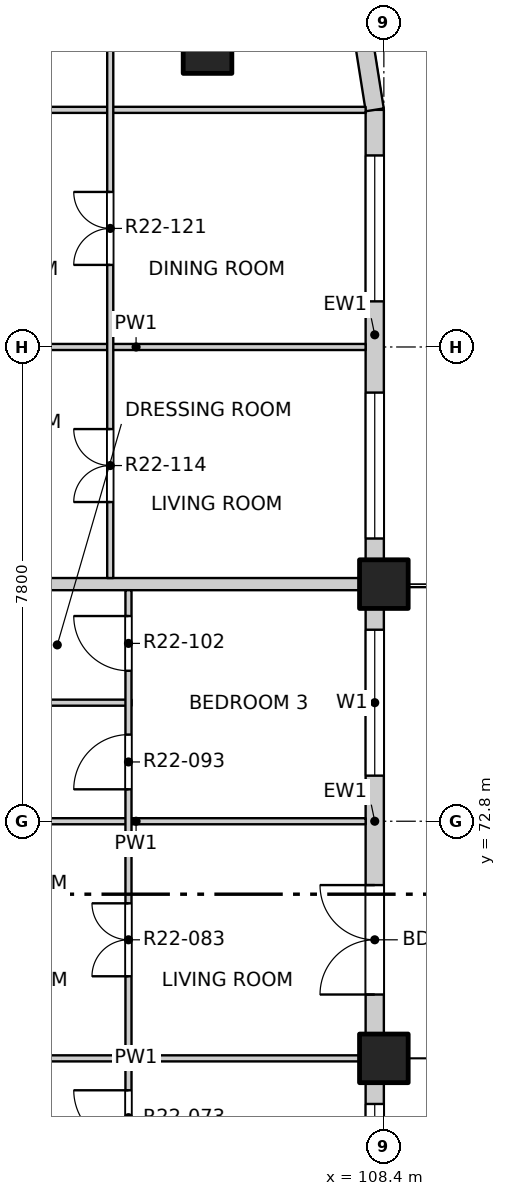
"""IFC4 building model, lengths in metres.
Left out: names, types, materials, properties, quantities, classifications, styles, units other than length and angle.
Written with IfcOpenShell. Run it as: python <this file> out.ifc"""

import sys

from ifc_helpers import new_model, si_unit, direction, frame, frame_2d, origin, origin_2d, place, context, subcontext, project, spatial, rectangle, extrude, element, fill, save


model = new_model("IFC4")
c1 = context("Model", 3, precision=1e-05, world=origin(), true_north=direction((0.0, 1.0)))
c2 = subcontext(c1, "Body", "Model", "MODEL_VIEW")
j1 = project(units=[si_unit("LENGTHUNIT", "METRE"), si_unit("PLANEANGLEUNIT", "RADIAN")], contexts=[c1])
p1 = place(None, origin())
s1 = spatial("IfcSite", under=j1, at=p1, CompositionType="ELEMENT")
p2 = place(p1, origin())
s2 = spatial("IfcBuilding", under=s1, at=p2, CompositionType="ELEMENT")
p3 = place(p2, frame((0.0, 0.0, 224.5)))
s3 = spatial("IfcBuildingStorey", under=s2, at=p3, CompositionType="ELEMENT", Elevation=224.5)
for number, where, z_axis, x_axis in (
    (1, (105.5, 85.5, -0.25), (0.0, 0.0, 1.0), (1.0, 0.0, 0.0)),
    (2, (108.4, 68.9, -0.25), (0.0, 0.0, 1.0), (1.0, 0.0, 0.0)),
    (3, (108.4, 76.7, -0.25), (0.0, 0.0, 1.0), (1.0, 0.0, 0.0)),
):
    element("IfcColumn", number, at=place(p3, frame(where, z_axis=z_axis, x_axis=x_axis)), inside=s3, PredefinedType="COLUMN", context=c2, shape_type="SweptSolid", body=[
        extrude(rectangle(XDim=0.8, YDim=0.8, at=origin_2d()), origin(), (0.0, 0.0, 1.0), 3.4),
    ])
p4 = place(p3, frame((108.25, 61.5, 0.0), z_axis=(0.0, 0.0, 1.0), x_axis=(0.0, 1.0, 0.0)))
e4 = element("IfcWall", 4, at=p4, inside=s3, PredefinedType="SOLIDWALL", context=c2, shape_type="SweptSolid", body=[
    extrude(rectangle(XDim=7.0, YDim=0.3, at=frame_2d((3.5, 0.0))), origin(), (0.0, 0.0, 1.0), 2.7),
])
p5 = place(p4, frame((0.65, 0.0, 0.0)))
e5 = element("IfcOpeningElement", 5, at=p5, cuts=e4, PredefinedType="OPENING", context=c2, shape_type="SweptSolid", body=[
    extrude(rectangle(XDim=1.8, YDim=2.4, at=frame_2d((0.9, 1.2))), frame((0.0, 0.16, 0.0), z_axis=(0.0, -1.0, 0.0), x_axis=(1.0, 0.0, 0.0)), (0.0, 0.0, 1.0), 0.32),
])
p6 = place(p4, frame((4.25, 0.0, 0.9)))
e6 = element("IfcOpeningElement", 6, at=p6, cuts=e4, PredefinedType="OPENING", context=c2, shape_type="SweptSolid", body=[
    extrude(rectangle(XDim=2.4, YDim=1.8, at=frame_2d((1.2, 0.9))), frame((0.0, 0.16, 0.0), z_axis=(0.0, -1.0, 0.0), x_axis=(1.0, 0.0, 0.0)), (0.0, 0.0, 1.0), 0.32),
])
p7 = place(p3, frame((108.25, 69.3, 0.0), z_axis=(0.0, 0.0, 1.0), x_axis=(0.0, 1.0, 0.0)))
e7 = element("IfcWall", 7, at=p7, inside=s3, PredefinedType="SOLIDWALL", context=c2, shape_type="SweptSolid", body=[
    extrude(rectangle(XDim=7.0, YDim=0.3, at=frame_2d((3.5, 0.0))), origin(), (0.0, 0.0, 1.0), 2.7),
])
p8 = place(p7, frame((0.65, 0.0, 0.0)))
e8 = element("IfcOpeningElement", 8, at=p8, cuts=e7, PredefinedType="OPENING", context=c2, shape_type="SweptSolid", body=[
    extrude(rectangle(XDim=1.8, YDim=2.4, at=frame_2d((0.9, 1.2))), frame((0.0, 0.16, 0.0), z_axis=(0.0, -1.0, 0.0), x_axis=(1.0, 0.0, 0.0)), (0.0, 0.0, 1.0), 0.32),
])
p9 = place(p7, frame((4.25, 0.0, 0.9)))
e9 = element("IfcOpeningElement", 9, at=p9, cuts=e7, PredefinedType="OPENING", context=c2, shape_type="SweptSolid", body=[
    extrude(rectangle(XDim=2.4, YDim=1.8, at=frame_2d((1.2, 0.9))), frame((0.0, 0.16, 0.0), z_axis=(0.0, -1.0, 0.0), x_axis=(1.0, 0.0, 0.0)), (0.0, 0.0, 1.0), 0.32),
])
p10 = place(p3, frame((108.25, 77.1, 0.0), z_axis=(0.0, 0.0, 1.0), x_axis=(0.0, 1.0, 0.0)))
e10 = element("IfcWall", 10, at=p10, inside=s3, PredefinedType="SOLIDWALL", context=c2, shape_type="SweptSolid", body=[
    extrude(rectangle(XDim=7.4, YDim=0.3, at=frame_2d((3.7, 0.0))), origin(), (0.0, 0.0, 1.0), 2.7),
])
p11 = place(p10, frame((0.35, 0.0, 0.9)))
e11 = element("IfcOpeningElement", 11, at=p11, cuts=e10, PredefinedType="OPENING", context=c2, shape_type="SweptSolid", body=[
    extrude(rectangle(XDim=2.4, YDim=1.8, at=frame_2d((1.2, 0.9))), frame((0.0, 0.16, 0.0), z_axis=(0.0, -1.0, 0.0), x_axis=(1.0, 0.0, 0.0)), (0.0, 0.0, 1.0), 0.32),
])
p12 = place(p10, frame((4.25, 0.0, 0.9)))
e12 = element("IfcOpeningElement", 12, at=p12, cuts=e10, PredefinedType="OPENING", context=c2, shape_type="SweptSolid", body=[
    extrude(rectangle(XDim=2.4, YDim=1.8, at=frame_2d((1.2, 0.9))), frame((0.0, 0.16, 0.0), z_axis=(0.0, -1.0, 0.0), x_axis=(1.0, 0.0, 0.0)), (0.0, 0.0, 1.0), 0.32),
])
p13 = place(p3, frame((108.25, 84.5, 0.0), z_axis=(0.0, 0.0, 1.0), x_axis=(-0.156496880861, 0.987678452879, 0.0)))
e13 = element("IfcWall", 13, at=p13, inside=s3, PredefinedType="SOLIDWALL", context=c2, shape_type="SweptSolid", body=[
    extrude(rectangle(XDim=1.173, YDim=0.3, at=frame_2d((0.586, 0.0))), origin(), (0.0, 0.0, 1.0), 2.7),
])
p14 = place(p3, frame((100.55, 68.9, 0.0), z_axis=(0.0, 0.0, 1.0), x_axis=(1.0, 0.0, 0.0)))
e14 = element("IfcWall", 14, at=p14, inside=s3, PredefinedType="PARTITIONING", context=c2, shape_type="SweptSolid", body=[
    extrude(rectangle(XDim=7.55, YDim=0.1, at=frame_2d((3.775, 0.0))), origin(), (0.0, 0.0, 1.0), 2.55),
])
p15 = place(p3, frame((100.55, 72.8, 0.0), z_axis=(0.0, 0.0, 1.0), x_axis=(1.0, 0.0, 0.0)))
e15 = element("IfcWall", 15, at=p15, inside=s3, PredefinedType="PARTITIONING", context=c2, shape_type="SweptSolid", body=[
    extrude(rectangle(XDim=7.55, YDim=0.1, at=frame_2d((3.775, 0.0))), origin(), (0.0, 0.0, 1.0), 3.15),
])
p16 = place(p3, frame((100.55, 74.75, 0.0), z_axis=(0.0, 0.0, 1.0), x_axis=(1.0, 0.0, 0.0)))
e16 = element("IfcWall", 16, at=p16, inside=s3, PredefinedType="PARTITIONING", context=c2, shape_type="SweptSolid", body=[
    extrude(rectangle(XDim=3.7, YDim=0.1, at=frame_2d((1.85, 0.0))), origin(), (0.0, 0.0, 1.0), 3.15),
])
p17 = place(p3, frame((96.6, 76.7, 0.0), z_axis=(0.0, 0.0, 1.0), x_axis=(1.0, 0.0, 0.0)))
e17 = element("IfcWall", 17, at=p17, inside=s3, PredefinedType="PARTITIONING", context=c2, shape_type="SweptSolid", body=[
    extrude(rectangle(XDim=11.5, YDim=0.2, at=frame_2d((5.75, 0.0))), origin(), (0.0, 0.0, 1.0), 2.55),
])
p18 = place(p3, frame((100.55, 80.6, 0.0), z_axis=(0.0, 0.0, 1.0), x_axis=(1.0, 0.0, 0.0)))
e18 = element("IfcWall", 18, at=p18, inside=s3, PredefinedType="PARTITIONING", context=c2, shape_type="SweptSolid", body=[
    extrude(rectangle(XDim=7.55, YDim=0.1, at=frame_2d((3.775, 0.0))), origin(), (0.0, 0.0, 1.0), 3.15),
])
p19 = place(p3, frame((96.6, 84.5, 0.0), z_axis=(0.0, 0.0, 1.0), x_axis=(1.0, 0.0, 0.0)))
e19 = element("IfcWall", 19, at=p19, inside=s3, PredefinedType="PARTITIONING", context=c2, shape_type="SweptSolid", body=[
    extrude(rectangle(XDim=11.5, YDim=0.1, at=frame_2d((5.75, 0.0))), origin(), (0.0, 0.0, 1.0), 3.15),
])
p20 = place(p19, frame((2.635, 0.0, 0.0)))
e20 = element("IfcOpeningElement", 20, at=p20, cuts=e19, PredefinedType="OPENING", context=c2, shape_type="SweptSolid", body=[
    extrude(rectangle(XDim=0.9, YDim=2.1, at=frame_2d((0.45, 1.05))), frame((0.0, 0.06, 0.0), z_axis=(0.0, -1.0, 0.0), x_axis=(1.0, 0.0, 0.0)), (0.0, 0.0, 1.0), 0.12),
])
p21 = place(p3, frame((103.9, 76.8, 0.0), z_axis=(0.0, 0.0, 1.0), x_axis=(0.0, 1.0, 0.0)))
e21 = element("IfcWall", 21, at=p21, inside=s3, PredefinedType="PARTITIONING", context=c2, shape_type="SweptSolid", body=[
    extrude(rectangle(XDim=11.3, YDim=0.1, at=frame_2d((5.65, 0.0))), origin(), (0.0, 0.0, 1.0), 3.15),
])
p22 = place(p21, frame((1.25, 0.0, 0.0)))
e22 = element("IfcOpeningElement", 22, at=p22, cuts=e21, PredefinedType="OPENING", context=c2, shape_type="SweptSolid", body=[
    extrude(rectangle(XDim=1.2, YDim=2.1, at=frame_2d((0.6, 1.05))), frame((0.0, 0.06, 0.0), z_axis=(0.0, -1.0, 0.0), x_axis=(1.0, 0.0, 0.0)), (0.0, 0.0, 1.0), 0.12),
])
p23 = place(p21, frame((5.15, 0.0, 0.0)))
e23 = element("IfcOpeningElement", 23, at=p23, cuts=e21, PredefinedType="OPENING", context=c2, shape_type="SweptSolid", body=[
    extrude(rectangle(XDim=1.2, YDim=2.1, at=frame_2d((0.6, 1.05))), frame((0.0, 0.06, 0.0), z_axis=(0.0, -1.0, 0.0), x_axis=(1.0, 0.0, 0.0)), (0.0, 0.0, 1.0), 0.12),
])
p24 = place(p21, frame((9.05, 0.0, 0.0)))
e24 = element("IfcOpeningElement", 24, at=p24, cuts=e21, PredefinedType="OPENING", context=c2, shape_type="SweptSolid", body=[
    extrude(rectangle(XDim=1.2, YDim=2.1, at=frame_2d((0.6, 1.05))), frame((0.0, 0.06, 0.0), z_axis=(0.0, -1.0, 0.0), x_axis=(1.0, 0.0, 0.0)), (0.0, 0.0, 1.0), 0.12),
])
p25 = place(p3, frame((104.2, 41.9, 0.0), z_axis=(0.0, 0.0, 1.0), x_axis=(0.0, 1.0, 0.0)))
e25 = element("IfcWall", 25, at=p25, inside=s3, PredefinedType="PARTITIONING", context=c2, shape_type="SweptSolid", body=[
    extrude(rectangle(XDim=34.7, YDim=0.1, at=frame_2d((17.35, 0.0))), origin(), (0.0, 0.0, 1.0), 3.15),
])
p26 = place(p25, frame((1.05, 0.0, 0.0)))
e26 = element("IfcOpeningElement", 26, at=p26, cuts=e25, PredefinedType="OPENING", context=c2, shape_type="SweptSolid", body=[
    extrude(rectangle(XDim=1.2, YDim=2.1, at=frame_2d((0.6, 1.05))), frame((0.0, 0.06, 0.0), z_axis=(0.0, -1.0, 0.0), x_axis=(1.0, 0.0, 0.0)), (0.0, 0.0, 1.0), 0.12),
])
p27 = place(p25, frame((4.125, 0.0, 0.0)))
e27 = element("IfcOpeningElement", 27, at=p27, cuts=e25, PredefinedType="OPENING", context=c2, shape_type="SweptSolid", body=[
    extrude(rectangle(XDim=0.9, YDim=2.1, at=frame_2d((0.45, 1.05))), frame((0.0, 0.06, 0.0), z_axis=(0.0, -1.0, 0.0), x_axis=(1.0, 0.0, 0.0)), (0.0, 0.0, 1.0), 0.12),
])
p28 = place(p25, frame((6.075, 0.0, 0.0)))
e28 = element("IfcOpeningElement", 28, at=p28, cuts=e25, PredefinedType="OPENING", context=c2, shape_type="SweptSolid", body=[
    extrude(rectangle(XDim=0.9, YDim=2.1, at=frame_2d((0.45, 1.05))), frame((0.0, 0.06, 0.0), z_axis=(0.0, -1.0, 0.0), x_axis=(1.0, 0.0, 0.0)), (0.0, 0.0, 1.0), 0.12),
])
p29 = place(p25, frame((8.85, 0.0, 0.0)))
e29 = element("IfcOpeningElement", 29, at=p29, cuts=e25, PredefinedType="OPENING", context=c2, shape_type="SweptSolid", body=[
    extrude(rectangle(XDim=1.2, YDim=2.1, at=frame_2d((0.6, 1.05))), frame((0.0, 0.06, 0.0), z_axis=(0.0, -1.0, 0.0), x_axis=(1.0, 0.0, 0.0)), (0.0, 0.0, 1.0), 0.12),
])
p30 = place(p25, frame((12.75, 0.0, 0.0)))
e30 = element("IfcOpeningElement", 30, at=p30, cuts=e25, PredefinedType="OPENING", context=c2, shape_type="SweptSolid", body=[
    extrude(rectangle(XDim=1.2, YDim=2.1, at=frame_2d((0.6, 1.05))), frame((0.0, 0.06, 0.0), z_axis=(0.0, -1.0, 0.0), x_axis=(1.0, 0.0, 0.0)), (0.0, 0.0, 1.0), 0.12),
])
p31 = place(p25, frame((15.825, 0.0, 0.0)))
e31 = element("IfcOpeningElement", 31, at=p31, cuts=e25, PredefinedType="OPENING", context=c2, shape_type="SweptSolid", body=[
    extrude(rectangle(XDim=0.9, YDim=2.1, at=frame_2d((0.45, 1.05))), frame((0.0, 0.06, 0.0), z_axis=(0.0, -1.0, 0.0), x_axis=(1.0, 0.0, 0.0)), (0.0, 0.0, 1.0), 0.12),
])
p32 = place(p25, frame((17.775, 0.0, 0.0)))
e32 = element("IfcOpeningElement", 32, at=p32, cuts=e25, PredefinedType="OPENING", context=c2, shape_type="SweptSolid", body=[
    extrude(rectangle(XDim=0.9, YDim=2.1, at=frame_2d((0.45, 1.05))), frame((0.0, 0.06, 0.0), z_axis=(0.0, -1.0, 0.0), x_axis=(1.0, 0.0, 0.0)), (0.0, 0.0, 1.0), 0.12),
])
p33 = place(p25, frame((19.725, 0.0, 0.0)))
e33 = element("IfcOpeningElement", 33, at=p33, cuts=e25, PredefinedType="OPENING", context=c2, shape_type="SweptSolid", body=[
    extrude(rectangle(XDim=0.9, YDim=2.1, at=frame_2d((0.45, 1.05))), frame((0.0, 0.06, 0.0), z_axis=(0.0, -1.0, 0.0), x_axis=(1.0, 0.0, 0.0)), (0.0, 0.0, 1.0), 0.12),
])
p34 = place(p25, frame((21.675, 0.0, 0.0)))
e34 = element("IfcOpeningElement", 34, at=p34, cuts=e25, PredefinedType="OPENING", context=c2, shape_type="SweptSolid", body=[
    extrude(rectangle(XDim=0.9, YDim=2.1, at=frame_2d((0.45, 1.05))), frame((0.0, 0.06, 0.0), z_axis=(0.0, -1.0, 0.0), x_axis=(1.0, 0.0, 0.0)), (0.0, 0.0, 1.0), 0.12),
])
p35 = place(p25, frame((23.625, 0.0, 0.0)))
e35 = element("IfcOpeningElement", 35, at=p35, cuts=e25, PredefinedType="OPENING", context=c2, shape_type="SweptSolid", body=[
    extrude(rectangle(XDim=0.9, YDim=2.1, at=frame_2d((0.45, 1.05))), frame((0.0, 0.06, 0.0), z_axis=(0.0, -1.0, 0.0), x_axis=(1.0, 0.0, 0.0)), (0.0, 0.0, 1.0), 0.12),
])
p36 = place(p25, frame((25.575, 0.0, 0.0)))
e36 = element("IfcOpeningElement", 36, at=p36, cuts=e25, PredefinedType="OPENING", context=c2, shape_type="SweptSolid", body=[
    extrude(rectangle(XDim=0.9, YDim=2.1, at=frame_2d((0.45, 1.05))), frame((0.0, 0.06, 0.0), z_axis=(0.0, -1.0, 0.0), x_axis=(1.0, 0.0, 0.0)), (0.0, 0.0, 1.0), 0.12),
])
p37 = place(p25, frame((28.35, 0.0, 0.0)))
e37 = element("IfcOpeningElement", 37, at=p37, cuts=e25, PredefinedType="OPENING", context=c2, shape_type="SweptSolid", body=[
    extrude(rectangle(XDim=1.2, YDim=2.1, at=frame_2d((0.6, 1.05))), frame((0.0, 0.06, 0.0), z_axis=(0.0, -1.0, 0.0), x_axis=(1.0, 0.0, 0.0)), (0.0, 0.0, 1.0), 0.12),
])
p38 = place(p25, frame((31.425, 0.0, 0.0)))
e38 = element("IfcOpeningElement", 38, at=p38, cuts=e25, PredefinedType="OPENING", context=c2, shape_type="SweptSolid", body=[
    extrude(rectangle(XDim=0.9, YDim=2.1, at=frame_2d((0.45, 1.05))), frame((0.0, 0.06, 0.0), z_axis=(0.0, -1.0, 0.0), x_axis=(1.0, 0.0, 0.0)), (0.0, 0.0, 1.0), 0.12),
])
p39 = place(p25, frame((33.375, 0.0, 0.0)))
e39 = element("IfcOpeningElement", 39, at=p39, cuts=e25, PredefinedType="OPENING", context=c2, shape_type="SweptSolid", body=[
    extrude(rectangle(XDim=0.9, YDim=2.1, at=frame_2d((0.45, 1.05))), frame((0.0, 0.06, 0.0), z_axis=(0.0, -1.0, 0.0), x_axis=(1.0, 0.0, 0.0)), (0.0, 0.0, 1.0), 0.12),
])
p40 = place(p6, origin())
e40 = element("IfcWindow", 40, at=p40, inside=s3, PartitioningType="DOUBLE_PANEL_VERTICAL", PredefinedType="WINDOW", context=c2, shape_type="SweptSolid", body=[
    extrude(rectangle(XDim=2.4, YDim=1.8, at=frame_2d((1.2, 0.9))), frame((0.0, 0.03, 0.0), z_axis=(0.0, -1.0, 0.0), x_axis=(1.0, 0.0, 0.0)), (0.0, 0.0, 1.0), 0.06),
])
fill(e6, e40)
p41 = place(p8, origin())
e41 = element("IfcDoor", 41, at=p41, inside=s3, OperationType="DOUBLE_DOOR_SINGLE_SWING", PredefinedType="DOOR", context=c2, shape_type="SweptSolid", body=[
    extrude(rectangle(XDim=1.8, YDim=2.4, at=frame_2d((0.9, 1.2))), frame((0.0, 0.025, 0.0), z_axis=(0.0, -1.0, 0.0), x_axis=(1.0, 0.0, 0.0)), (0.0, 0.0, 1.0), 0.05),
])
fill(e8, e41)
p42 = place(p9, origin())
e42 = element("IfcWindow", 42, at=p42, inside=s3, PartitioningType="DOUBLE_PANEL_VERTICAL", PredefinedType="WINDOW", context=c2, shape_type="SweptSolid", body=[
    extrude(rectangle(XDim=2.4, YDim=1.8, at=frame_2d((1.2, 0.9))), frame((0.0, 0.03, 0.0), z_axis=(0.0, -1.0, 0.0), x_axis=(1.0, 0.0, 0.0)), (0.0, 0.0, 1.0), 0.06),
])
fill(e9, e42)
p43 = place(p11, origin())
e43 = element("IfcWindow", 43, at=p43, inside=s3, PartitioningType="DOUBLE_PANEL_VERTICAL", PredefinedType="WINDOW", context=c2, shape_type="SweptSolid", body=[
    extrude(rectangle(XDim=2.4, YDim=1.8, at=frame_2d((1.2, 0.9))), frame((0.0, 0.03, 0.0), z_axis=(0.0, -1.0, 0.0), x_axis=(1.0, 0.0, 0.0)), (0.0, 0.0, 1.0), 0.06),
])
fill(e11, e43)
p44 = place(p12, origin())
e44 = element("IfcWindow", 44, at=p44, inside=s3, PartitioningType="DOUBLE_PANEL_VERTICAL", PredefinedType="WINDOW", context=c2, shape_type="SweptSolid", body=[
    extrude(rectangle(XDim=2.4, YDim=1.8, at=frame_2d((1.2, 0.9))), frame((0.0, 0.03, 0.0), z_axis=(0.0, -1.0, 0.0), x_axis=(1.0, 0.0, 0.0)), (0.0, 0.0, 1.0), 0.06),
])
fill(e12, e44)
p45 = place(p36, origin())
e45 = element("IfcDoor", 45, at=p45, inside=s3, OperationType="SINGLE_SWING_RIGHT", PredefinedType="DOOR", context=c2, shape_type="SweptSolid", body=[
    extrude(rectangle(XDim=0.9, YDim=2.1, at=frame_2d((0.45, 1.05))), frame((0.0, 0.025, 0.0), z_axis=(0.0, -1.0, 0.0), x_axis=(1.0, 0.0, 0.0)), (0.0, 0.0, 1.0), 0.05),
])
fill(e36, e45)
p46 = place(p37, origin())
e46 = element("IfcDoor", 46, at=p46, inside=s3, OperationType="DOUBLE_DOOR_SINGLE_SWING", PredefinedType="DOOR", context=c2, shape_type="SweptSolid", body=[
    extrude(rectangle(XDim=1.2, YDim=2.1, at=frame_2d((0.6, 1.05))), frame((0.0, 0.025, 0.0), z_axis=(0.0, -1.0, 0.0), x_axis=(1.0, 0.0, 0.0)), (0.0, 0.0, 1.0), 0.05),
])
fill(e37, e46)
p47 = place(p38, origin())
e47 = element("IfcDoor", 47, at=p47, inside=s3, OperationType="SINGLE_SWING_LEFT", PredefinedType="DOOR", context=c2, shape_type="SweptSolid", body=[
    extrude(rectangle(XDim=0.9, YDim=2.1, at=frame_2d((0.45, 1.05))), frame((0.0, 0.025, 0.0), z_axis=(0.0, -1.0, 0.0), x_axis=(1.0, 0.0, 0.0)), (0.0, 0.0, 1.0), 0.05),
])
fill(e38, e47)
p48 = place(p39, origin())
e48 = element("IfcDoor", 48, at=p48, inside=s3, OperationType="SINGLE_SWING_RIGHT", PredefinedType="DOOR", context=c2, shape_type="SweptSolid", body=[
    extrude(rectangle(XDim=0.9, YDim=2.1, at=frame_2d((0.45, 1.05))), frame((0.0, 0.025, 0.0), z_axis=(0.0, -1.0, 0.0), x_axis=(1.0, 0.0, 0.0)), (0.0, 0.0, 1.0), 0.05),
])
fill(e39, e48)
p49 = place(p22, origin())
e49 = element("IfcDoor", 49, at=p49, inside=s3, OperationType="DOUBLE_DOOR_SINGLE_SWING", PredefinedType="DOOR", context=c2, shape_type="SweptSolid", body=[
    extrude(rectangle(XDim=1.2, YDim=2.1, at=frame_2d((0.6, 1.05))), frame((0.0, 0.025, 0.0), z_axis=(0.0, -1.0, 0.0), x_axis=(1.0, 0.0, 0.0)), (0.0, 0.0, 1.0), 0.05),
])
fill(e22, e49)
p50 = place(p23, origin())
e50 = element("IfcDoor", 50, at=p50, inside=s3, OperationType="DOUBLE_DOOR_SINGLE_SWING", PredefinedType="DOOR", context=c2, shape_type="SweptSolid", body=[
    extrude(rectangle(XDim=1.2, YDim=2.1, at=frame_2d((0.6, 1.05))), frame((0.0, 0.025, 0.0), z_axis=(0.0, -1.0, 0.0), x_axis=(1.0, 0.0, 0.0)), (0.0, 0.0, 1.0), 0.05),
])
fill(e23, e50)
save(model, sys.argv[1])
